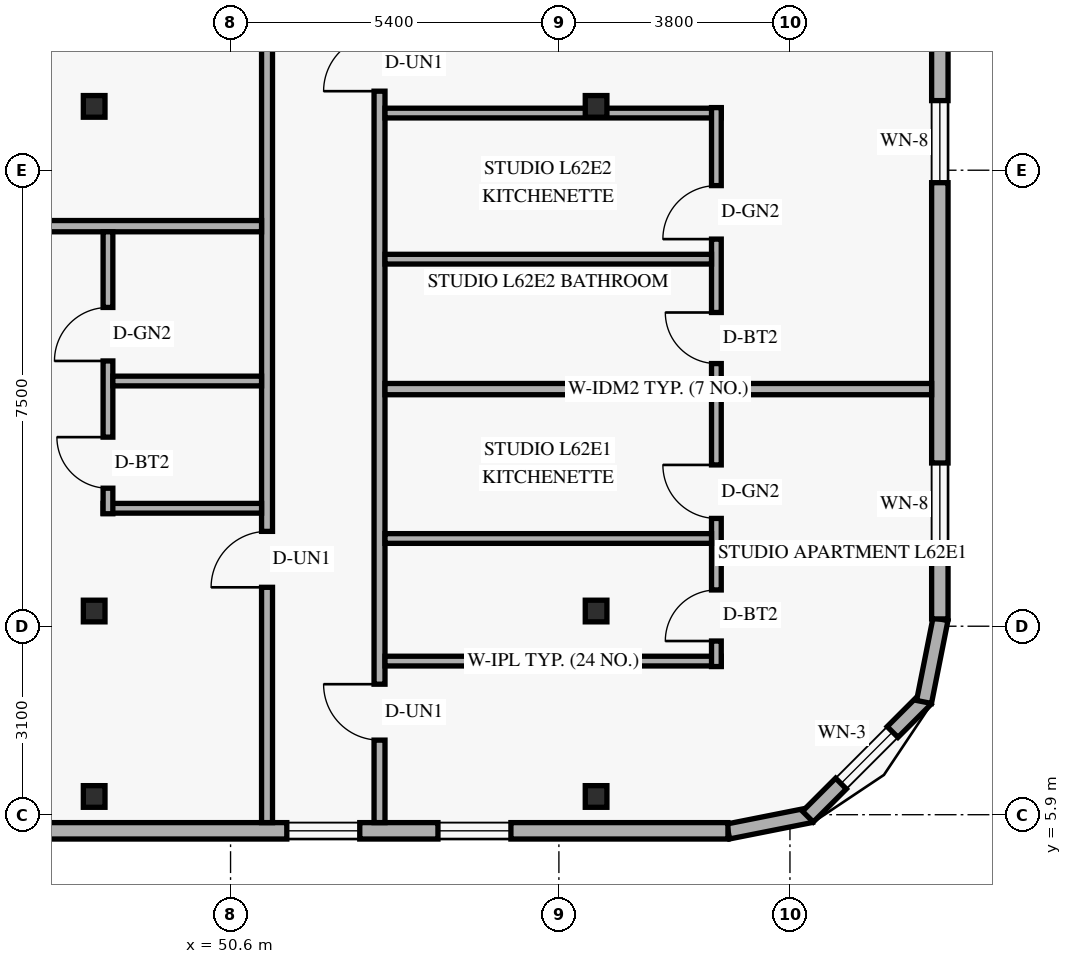
"""IFC4 building model, lengths in metres.
Left out: names, types, materials, properties, quantities, classifications, styles, units other than length and angle.
Written with IfcOpenShell. Run it as: python <this file> out.ifc"""

import sys

from ifc_helpers import new_model, si_unit, direction, frame, frame_2d, origin, origin_2d, place, context, subcontext, project, spatial, rectangle, hollow_rectangle, extrude, element, fill, save


model = new_model("IFC4")
c1 = context("Model", 3, precision=1e-05, world=origin(), true_north=direction((0.0, 1.0)))
c2 = subcontext(c1, "Body", "Model", "MODEL_VIEW")
j1 = project(units=[si_unit("LENGTHUNIT", "METRE"), si_unit("PLANEANGLEUNIT", "RADIAN")], contexts=[c1])
p1 = place(None, origin())
s1 = spatial("IfcSite", under=j1, at=p1, CompositionType="ELEMENT")
p2 = place(p1, origin())
s2 = spatial("IfcBuilding", under=s1, at=p2, CompositionType="ELEMENT")
p3 = place(p2, frame((0.0, 0.0, 238.8)))
s3 = spatial("IfcBuildingStorey", under=s2, at=p3, CompositionType="ELEMENT", Elevation=238.8)
for number, where, z_axis, x_axis in (
    (1, (48.294, 6.2, 0.0), (0.035, 0.0, 0.999), (0.0, 1.0, 0.0)),
    (2, (48.294, 9.25, 0.0), (0.035, 0.0, 0.999), (0.0, 1.0, 0.0)),
    (3, (48.294, 17.55, 0.0), (0.035, 0.0, 0.999), (0.0, 1.0, 0.0)),
):
    element("IfcColumn", number, at=place(p3, frame(where, z_axis=z_axis, x_axis=x_axis)), inside=s3, PredefinedType="COLUMN", context=c2, shape_type="SweptSolid", body=[
        extrude(hollow_rectangle(XDim=0.356, YDim=0.356, WallThickness=0.016, at=origin_2d()), origin(), (0.0, 0.0, 1.0), 3.602),
    ])
for number, where, z_axis, x_axis in (
    (4, (56.507, 6.2, 0.0), (0.058, 0.0, 0.998), (0.0, 1.0, 0.0)),
    (5, (56.507, 9.25, 0.0), (0.058, 0.0, 0.998), (0.0, 1.0, 0.0)),
    (6, (56.507, 17.55, 0.0), (0.058, 0.0, 0.998), (0.0, 1.0, 0.0)),
):
    element("IfcColumn", number, at=place(p3, frame(where, z_axis=z_axis, x_axis=x_axis)), inside=s3, PredefinedType="COLUMN", context=c2, shape_type="SweptSolid", body=[
        extrude(hollow_rectangle(XDim=0.356, YDim=0.356, WallThickness=0.016, at=origin_2d()), origin(), (0.0, 0.0, 1.0), 3.606),
    ])
p4 = place(p3, frame((58.783, 5.624, 0.0), z_axis=(0.0, 0.0, 1.0), x_axis=(0.980809899341, 0.19496651342, 0.0)))
e7 = element("IfcWall", 7, at=p4, inside=s3, PredefinedType="SOLIDWALL", context=c2, shape_type="SweptSolid", body=[
    extrude(rectangle(XDim=1.389, YDim=0.25, at=frame_2d((0.694, 0.0))), origin(), (0.0, 0.0, 1.0), 3.36),
])
p5 = place(p3, frame((60.095, 5.868, 0.0), z_axis=(0.0, 0.0, 1.0), x_axis=(0.707106781187, 0.707106781187, 0.0)))
e8 = element("IfcWall", 8, at=p5, inside=s3, PredefinedType="SOLIDWALL", context=c2, shape_type="SweptSolid", body=[
    extrude(rectangle(XDim=2.739, YDim=0.25, at=frame_2d((1.37, 0.0))), origin(), (0.0, 0.0, 1.0), 3.36),
])
p6 = place(p5, frame((0.77, 0.0, 0.85)))
e9 = element("IfcOpeningElement", 9, at=p6, cuts=e8, PredefinedType="OPENING", context=c2, shape_type="SweptSolid", body=[
    extrude(rectangle(XDim=1.2, YDim=1.5, at=frame_2d((0.6, 0.75))), frame((0.0, 0.135, 0.0), z_axis=(0.0, -1.0, 0.0), x_axis=(1.0, 0.0, 0.0)), (0.0, 0.0, 1.0), 0.27),
])
p7 = place(p3, frame((62.005, 7.754, 0.0), z_axis=(0.0, 0.0, 1.0), x_axis=(0.195135625965, 0.9807762678, 0.0)))
e10 = element("IfcWall", 10, at=p7, inside=s3, PredefinedType="SOLIDWALL", context=c2, shape_type="SweptSolid", body=[
    extrude(rectangle(XDim=1.389, YDim=0.25, at=frame_2d((0.694, 0.0))), origin(), (0.0, 0.0, 1.0), 3.36),
])
p8 = place(p3, frame((25.82, 5.635, 0.0), z_axis=(0.0, 0.0, 1.0), x_axis=(1.0, 0.0, 0.0)))
e11 = element("IfcWall", 11, at=p8, inside=s3, PredefinedType="SOLIDWALL", context=c2, shape_type="SweptSolid", body=[
    extrude(rectangle(XDim=32.96, YDim=0.27, at=frame_2d((16.48, 0.0))), origin(), (0.0, 0.0, 1.0), 3.36),
])
p9 = place(p8, frame((3.87, 0.0, 0.85)))
e12 = element("IfcOpeningElement", 12, at=p9, cuts=e11, PredefinedType="OPENING", context=c2, shape_type="SweptSolid", body=[
    extrude(rectangle(XDim=1.2, YDim=1.5, at=frame_2d((0.6, 0.75))), frame((0.0, 0.145, 0.0), z_axis=(0.0, -1.0, 0.0), x_axis=(1.0, 0.0, 0.0)), (0.0, 0.0, 1.0), 0.29),
])
p10 = place(p8, frame((16.313, 0.0, 0.85)))
e13 = element("IfcOpeningElement", 13, at=p10, cuts=e11, PredefinedType="OPENING", context=c2, shape_type="SweptSolid", body=[
    extrude(rectangle(XDim=1.2, YDim=1.5, at=frame_2d((0.6, 0.75))), frame((0.0, 0.145, 0.0), z_axis=(0.0, -1.0, 0.0), x_axis=(1.0, 0.0, 0.0)), (0.0, 0.0, 1.0), 0.29),
])
p11 = place(p8, frame((25.705, 0.0, 0.85)))
e14 = element("IfcOpeningElement", 14, at=p11, cuts=e11, PredefinedType="OPENING", context=c2, shape_type="SweptSolid", body=[
    extrude(rectangle(XDim=1.2, YDim=1.5, at=frame_2d((0.6, 0.75))), frame((0.0, 0.145, 0.0), z_axis=(0.0, -1.0, 0.0), x_axis=(1.0, 0.0, 0.0)), (0.0, 0.0, 1.0), 0.29),
])
p12 = place(p8, frame((28.191, 0.0, 0.85)))
e15 = element("IfcOpeningElement", 15, at=p12, cuts=e11, PredefinedType="OPENING", context=c2, shape_type="SweptSolid", body=[
    extrude(rectangle(XDim=1.2, YDim=1.5, at=frame_2d((0.6, 0.75))), frame((0.0, 0.145, 0.0), z_axis=(0.0, -1.0, 0.0), x_axis=(1.0, 0.0, 0.0)), (0.0, 0.0, 1.0), 0.29),
])
p13 = place(p3, frame((62.265, 9.12, 0.0), z_axis=(0.0, 0.0, 1.0), x_axis=(0.0, 1.0, 0.0)))
e16 = element("IfcWall", 16, at=p13, inside=s3, PredefinedType="SOLIDWALL", context=c2, shape_type="SweptSolid", body=[
    extrude(rectangle(XDim=29.76, YDim=0.27, at=frame_2d((14.88, 0.0))), origin(), (0.0, 0.0, 1.0), 3.36),
])
p14 = place(p13, frame((1.215, 0.0, 0.85)))
e17 = element("IfcOpeningElement", 17, at=p14, cuts=e16, PredefinedType="OPENING", context=c2, shape_type="SweptSolid", body=[
    extrude(rectangle(XDim=1.35, YDim=1.55, at=frame_2d((0.675, 0.775))), frame((0.0, 0.145, 0.0), z_axis=(0.0, -1.0, 0.0), x_axis=(1.0, 0.0, 0.0)), (0.0, 0.0, 1.0), 0.29),
])
p15 = place(p13, frame((7.175, 0.0, 0.85)))
e18 = element("IfcOpeningElement", 18, at=p15, cuts=e16, PredefinedType="OPENING", context=c2, shape_type="SweptSolid", body=[
    extrude(rectangle(XDim=1.35, YDim=1.55, at=frame_2d((0.675, 0.775))), frame((0.0, 0.145, 0.0), z_axis=(0.0, -1.0, 0.0), x_axis=(1.0, 0.0, 0.0)), (0.0, 0.0, 1.0), 0.29),
])
p16 = place(p13, frame((14.17, 0.0, 0.85)))
e19 = element("IfcOpeningElement", 19, at=p16, cuts=e16, PredefinedType="OPENING", context=c2, shape_type="SweptSolid", body=[
    extrude(rectangle(XDim=1.35, YDim=1.55, at=frame_2d((0.675, 0.775))), frame((0.0, 0.145, 0.0), z_axis=(0.0, -1.0, 0.0), x_axis=(1.0, 0.0, 0.0)), (0.0, 0.0, 1.0), 0.29),
])
p17 = place(p13, frame((18.24, 0.0, 0.85)))
e20 = element("IfcOpeningElement", 20, at=p17, cuts=e16, PredefinedType="OPENING", context=c2, shape_type="SweptSolid", body=[
    extrude(rectangle(XDim=1.35, YDim=1.55, at=frame_2d((0.675, 0.775))), frame((0.0, 0.145, 0.0), z_axis=(0.0, -1.0, 0.0), x_axis=(1.0, 0.0, 0.0)), (0.0, 0.0, 1.0), 0.29),
])
p18 = place(p13, frame((22.9, 0.0, 0.85)))
e21 = element("IfcOpeningElement", 21, at=p18, cuts=e16, PredefinedType="OPENING", context=c2, shape_type="SweptSolid", body=[
    extrude(rectangle(XDim=1.35, YDim=1.55, at=frame_2d((0.675, 0.775))), frame((0.0, 0.145, 0.0), z_axis=(0.0, -1.0, 0.0), x_axis=(1.0, 0.0, 0.0)), (0.0, 0.0, 1.0), 0.29),
])
p19 = place(p13, frame((27.75, 0.0, 0.85)))
e22 = element("IfcOpeningElement", 22, at=p19, cuts=e16, PredefinedType="OPENING", context=c2, shape_type="SweptSolid", body=[
    extrude(rectangle(XDim=1.35, YDim=1.55, at=frame_2d((0.675, 0.775))), frame((0.0, 0.145, 0.0), z_axis=(0.0, -1.0, 0.0), x_axis=(1.0, 0.0, 0.0)), (0.0, 0.0, 1.0), 0.29),
])
p20 = place(p3, frame((51.2, 5.77, 0.0), z_axis=(0.0, 0.0, 1.0), x_axis=(0.0, 1.0, 0.0)))
e23 = element("IfcWall", 23, at=p20, inside=s3, PredefinedType="STANDARD", context=c2, shape_type="SweptSolid", body=[
    extrude(rectangle(XDim=13.03, YDim=0.18, at=frame_2d((6.515, 0.0))), origin(), (0.0, 0.0, 1.0), 2.803),
])
p21 = place(p20, frame((3.87, 0.0, 0.0)))
e24 = element("IfcOpeningElement", 24, at=p21, cuts=e23, PredefinedType="OPENING", context=c2, shape_type="SweptSolid", body=[
    extrude(rectangle(XDim=0.92, YDim=2.15, at=frame_2d((0.46, 1.075))), frame((0.0, 0.1, 0.0), z_axis=(0.0, -1.0, 0.0), x_axis=(1.0, 0.0, 0.0)), (0.0, 0.0, 1.0), 0.2),
])
p22 = place(p3, frame((53.05, 5.77, 0.0), z_axis=(0.0, 0.0, 1.0), x_axis=(0.0, 1.0, 0.0)))
e25 = element("IfcWall", 25, at=p22, inside=s3, PredefinedType="STANDARD", context=c2, shape_type="SweptSolid", body=[
    extrude(rectangle(XDim=36.46, YDim=0.18, at=frame_2d((18.23, 0.0))), origin(), (0.0, 0.0, 1.0), 2.803),
])
p23 = place(p22, frame((1.357, 0.0, 0.0)))
e26 = element("IfcOpeningElement", 26, at=p23, cuts=e25, PredefinedType="OPENING", context=c2, shape_type="SweptSolid", body=[
    extrude(rectangle(XDim=0.92, YDim=2.15, at=frame_2d((0.46, 1.075))), frame((0.0, 0.1, 0.0), z_axis=(0.0, -1.0, 0.0), x_axis=(1.0, 0.0, 0.0)), (0.0, 0.0, 1.0), 0.2),
])
p24 = place(p22, frame((12.03, 0.0, 0.0)))
e27 = element("IfcOpeningElement", 27, at=p24, cuts=e25, PredefinedType="OPENING", context=c2, shape_type="SweptSolid", body=[
    extrude(rectangle(XDim=0.92, YDim=2.15, at=frame_2d((0.46, 1.075))), frame((0.0, 0.1, 0.0), z_axis=(0.0, -1.0, 0.0), x_axis=(1.0, 0.0, 0.0)), (0.0, 0.0, 1.0), 0.2),
])
p25 = place(p22, frame((20.27, 0.0, 0.0)))
e28 = element("IfcOpeningElement", 28, at=p25, cuts=e25, PredefinedType="OPENING", context=c2, shape_type="SweptSolid", body=[
    extrude(rectangle(XDim=0.92, YDim=2.15, at=frame_2d((0.46, 1.075))), frame((0.0, 0.1, 0.0), z_axis=(0.0, -1.0, 0.0), x_axis=(1.0, 0.0, 0.0)), (0.0, 0.0, 1.0), 0.2),
])
p26 = place(p22, frame((28.21, 0.0, 0.0)))
e29 = element("IfcOpeningElement", 29, at=p26, cuts=e25, PredefinedType="OPENING", context=c2, shape_type="SweptSolid", body=[
    extrude(rectangle(XDim=0.92, YDim=2.15, at=frame_2d((0.46, 1.075))), frame((0.0, 0.1, 0.0), z_axis=(0.0, -1.0, 0.0), x_axis=(1.0, 0.0, 0.0)), (0.0, 0.0, 1.0), 0.2),
])
p27 = place(p22, frame((35.21, 0.0, 0.0)))
e30 = element("IfcOpeningElement", 30, at=p27, cuts=e25, PredefinedType="OPENING", context=c2, shape_type="SweptSolid", body=[
    extrude(rectangle(XDim=0.92, YDim=2.15, at=frame_2d((0.46, 1.075))), frame((0.0, 0.1, 0.0), z_axis=(0.0, -1.0, 0.0), x_axis=(1.0, 0.0, 0.0)), (0.0, 0.0, 1.0), 0.2),
])
p28 = place(p3, frame((53.14, 8.427, 0.0), z_axis=(0.0, 0.0, 1.0), x_axis=(1.0, 0.0, 0.0)))
e31 = element("IfcWall", 31, at=p28, inside=s3, PredefinedType="PLUMBINGWALL", context=c2, shape_type="SweptSolid", body=[
    extrude(rectangle(XDim=5.53, YDim=0.16, at=frame_2d((2.765, 0.0))), origin(), (0.0, 0.0, 1.0), 2.879),
])
p29 = place(p3, frame((58.59, 8.337, 0.0), z_axis=(0.0, 0.0, 1.0), x_axis=(0.0, 1.0, 0.0)))
e32 = element("IfcWall", 32, at=p29, inside=s3, PredefinedType="PLUMBINGWALL", context=c2, shape_type="SweptSolid", body=[
    extrude(rectangle(XDim=4.563, YDim=0.16, at=frame_2d((2.282, 0.0))), origin(), (0.0, 0.0, 1.0), 3.36),
])
p30 = place(p29, frame((0.42, 0.0, 0.0)))
e33 = element("IfcOpeningElement", 33, at=p30, cuts=e32, PredefinedType="OPENING", context=c2, shape_type="SweptSolid", body=[
    extrude(rectangle(XDim=0.84, YDim=2.12, at=frame_2d((0.42, 1.06))), frame((0.0, 0.09, 0.0), z_axis=(0.0, -1.0, 0.0), x_axis=(1.0, 0.0, 0.0)), (0.0, 0.0, 1.0), 0.18),
])
p31 = place(p29, frame((2.436, 0.0, 0.0)))
e34 = element("IfcOpeningElement", 34, at=p31, cuts=e32, PredefinedType="OPENING", context=c2, shape_type="SweptSolid", body=[
    extrude(rectangle(XDim=0.88, YDim=2.12, at=frame_2d((0.44, 1.06))), frame((0.0, 0.09, 0.0), z_axis=(0.0, -1.0, 0.0), x_axis=(1.0, 0.0, 0.0)), (0.0, 0.0, 1.0), 0.18),
])
p32 = place(p3, frame((53.14, 10.443, 0.0), z_axis=(0.0, 0.0, 1.0), x_axis=(1.0, 0.0, 0.0)))
e35 = element("IfcWall", 35, at=p32, inside=s3, PredefinedType="PLUMBINGWALL", context=c2, shape_type="SweptSolid", body=[
    extrude(rectangle(XDim=5.37, YDim=0.16, at=frame_2d((2.685, 0.0))), origin(), (0.0, 0.0, 1.0), 2.879),
])
p33 = place(p3, frame((53.14, 12.9, 0.0), z_axis=(0.0, 0.0, 1.0), x_axis=(1.0, 0.0, 0.0)))
e36 = element("IfcWall", 36, at=p33, inside=s3, PredefinedType="PARTITIONING", context=c2, shape_type="SweptSolid", body=[
    extrude(rectangle(XDim=8.99, YDim=0.185, at=frame_2d((4.495, 0.0))), origin(), (0.0, 0.0, 1.0), 2.879),
])
p34 = place(p3, frame((53.14, 17.44, 0.0), z_axis=(0.0, 0.0, 1.0), x_axis=(1.0, 0.0, 0.0)))
e37 = element("IfcWall", 37, at=p34, inside=s3, PredefinedType="PLUMBINGWALL", context=c2, shape_type="SweptSolid", body=[
    extrude(rectangle(XDim=5.53, YDim=0.16, at=frame_2d((2.765, 0.0))), origin(), (0.0, 0.0, 1.0), 2.803),
])
p35 = place(p3, frame((58.59, 12.992, 0.0), z_axis=(0.0, 0.0, 1.0), x_axis=(0.0, 1.0, 0.0)))
e38 = element("IfcWall", 38, at=p35, inside=s3, PredefinedType="PLUMBINGWALL", context=c2, shape_type="SweptSolid", body=[
    extrude(rectangle(XDim=4.538, YDim=0.16, at=frame_2d((2.269, 0.0))), origin(), (0.0, 0.0, 1.0), 3.36),
])
p36 = place(p35, frame((0.327, 0.0, 0.0)))
e39 = element("IfcOpeningElement", 39, at=p36, cuts=e38, PredefinedType="OPENING", context=c2, shape_type="SweptSolid", body=[
    extrude(rectangle(XDim=0.84, YDim=2.12, at=frame_2d((0.42, 1.06))), frame((0.0, 0.09, 0.0), z_axis=(0.0, -1.0, 0.0), x_axis=(1.0, 0.0, 0.0)), (0.0, 0.0, 1.0), 0.18),
])
p37 = place(p35, frame((2.375, 0.0, 0.0)))
e40 = element("IfcOpeningElement", 40, at=p37, cuts=e38, PredefinedType="OPENING", context=c2, shape_type="SweptSolid", body=[
    extrude(rectangle(XDim=0.88, YDim=2.12, at=frame_2d((0.44, 1.06))), frame((0.0, 0.09, 0.0), z_axis=(0.0, -1.0, 0.0), x_axis=(1.0, 0.0, 0.0)), (0.0, 0.0, 1.0), 0.18),
])
p38 = place(p3, frame((53.14, 15.037, 0.0), z_axis=(0.0, 0.0, 1.0), x_axis=(1.0, 0.0, 0.0)))
e41 = element("IfcWall", 41, at=p38, inside=s3, PredefinedType="PLUMBINGWALL", context=c2, shape_type="SweptSolid", body=[
    extrude(rectangle(XDim=5.37, YDim=0.16, at=frame_2d((2.685, 0.0))), origin(), (0.0, 0.0, 1.0), 2.879),
])
p39 = place(p3, frame((37.64, 15.58, 0.0), z_axis=(0.0, 0.0, 1.0), x_axis=(1.0, 0.0, 0.0)))
e42 = element("IfcWall", 42, at=p39, inside=s3, PredefinedType="PARTITIONING", context=c2, shape_type="SweptSolid", body=[
    extrude(rectangle(XDim=13.47, YDim=0.185, at=frame_2d((6.735, 0.0))), origin(), (0.0, 0.0, 1.0), 2.803),
])
p40 = place(p3, frame((48.504, 10.94, 0.0), z_axis=(0.0, 0.0, 1.0), x_axis=(1.0, 0.0, 0.0)))
e43 = element("IfcWall", 43, at=p40, inside=s3, PredefinedType="PLUMBINGWALL", context=c2, shape_type="SweptSolid", body=[
    extrude(rectangle(XDim=2.606, YDim=0.16, at=frame_2d((1.303, 0.0))), origin(), (0.0, 0.0, 1.0), 2.803),
])
p41 = place(p3, frame((48.584, 10.85, 0.0), z_axis=(0.0, 0.0, 1.0), x_axis=(0.0, 1.0, 0.0)))
e44 = element("IfcWall", 44, at=p41, inside=s3, PredefinedType="PLUMBINGWALL", context=c2, shape_type="SweptSolid", body=[
    extrude(rectangle(XDim=4.637, YDim=0.16, at=frame_2d((2.319, 0.0))), origin(), (0.0, 0.0, 1.0), 2.803),
])
p42 = place(p41, frame((0.42, 0.0, 0.0)))
e45 = element("IfcOpeningElement", 45, at=p42, cuts=e44, PredefinedType="OPENING", context=c2, shape_type="SweptSolid", body=[
    extrude(rectangle(XDim=0.84, YDim=2.12, at=frame_2d((0.42, 1.06))), frame((0.0, 0.09, 0.0), z_axis=(0.0, -1.0, 0.0), x_axis=(1.0, 0.0, 0.0)), (0.0, 0.0, 1.0), 0.18),
])
p43 = place(p41, frame((2.513, 0.0, 0.0)))
e46 = element("IfcOpeningElement", 46, at=p43, cuts=e44, PredefinedType="OPENING", context=c2, shape_type="SweptSolid", body=[
    extrude(rectangle(XDim=0.88, YDim=2.12, at=frame_2d((0.44, 1.06))), frame((0.0, 0.09, 0.0), z_axis=(0.0, -1.0, 0.0), x_axis=(1.0, 0.0, 0.0)), (0.0, 0.0, 1.0), 0.18),
])
p44 = place(p3, frame((48.664, 13.033, 0.0), z_axis=(0.0, 0.0, 1.0), x_axis=(1.0, 0.0, 0.0)))
e47 = element("IfcWall", 47, at=p44, inside=s3, PredefinedType="PLUMBINGWALL", context=c2, shape_type="SweptSolid", body=[
    extrude(rectangle(XDim=2.446, YDim=0.16, at=frame_2d((1.223, 0.0))), origin(), (0.0, 0.0, 1.0), 3.36),
])
p45 = place(p6, origin())
e48 = element("IfcWindow", 48, at=p45, inside=s3, PartitioningType="SINGLE_PANEL", PredefinedType="WINDOW", context=c2, shape_type="SweptSolid", body=[
    extrude(rectangle(XDim=1.2, YDim=1.5, at=frame_2d((0.6, 0.75))), frame((0.0, 0.03, 0.0), z_axis=(0.0, -1.0, 0.0), x_axis=(1.0, 0.0, 0.0)), (0.0, 0.0, 1.0), 0.06),
])
fill(e9, e48)
p46 = place(p11, origin())
e49 = element("IfcWindow", 49, at=p46, inside=s3, PartitioningType="SINGLE_PANEL", PredefinedType="WINDOW", context=c2, shape_type="SweptSolid", body=[
    extrude(rectangle(XDim=1.2, YDim=1.5, at=frame_2d((0.6, 0.75))), frame((0.0, 0.03, 0.0), z_axis=(0.0, -1.0, 0.0), x_axis=(1.0, 0.0, 0.0)), (0.0, 0.0, 1.0), 0.06),
])
fill(e14, e49)
p47 = place(p12, origin())
e50 = element("IfcWindow", 50, at=p47, inside=s3, PartitioningType="SINGLE_PANEL", PredefinedType="WINDOW", context=c2, shape_type="SweptSolid", body=[
    extrude(rectangle(XDim=1.2, YDim=1.5, at=frame_2d((0.6, 0.75))), frame((0.0, 0.03, 0.0), z_axis=(0.0, -1.0, 0.0), x_axis=(1.0, 0.0, 0.0)), (0.0, 0.0, 1.0), 0.06),
])
fill(e15, e50)
p48 = place(p14, origin())
e51 = element("IfcWindow", 51, at=p48, inside=s3, PartitioningType="SINGLE_PANEL", PredefinedType="WINDOW", context=c2, shape_type="SweptSolid", body=[
    extrude(rectangle(XDim=1.35, YDim=1.55, at=frame_2d((0.675, 0.775))), frame((0.0, 0.03, 0.0), z_axis=(0.0, -1.0, 0.0), x_axis=(1.0, 0.0, 0.0)), (0.0, 0.0, 1.0), 0.06),
])
fill(e17, e51)
p49 = place(p15, origin())
e52 = element("IfcWindow", 52, at=p49, inside=s3, PartitioningType="SINGLE_PANEL", PredefinedType="WINDOW", context=c2, shape_type="SweptSolid", body=[
    extrude(rectangle(XDim=1.35, YDim=1.55, at=frame_2d((0.675, 0.775))), frame((0.0, 0.03, 0.0), z_axis=(0.0, -1.0, 0.0), x_axis=(1.0, 0.0, 0.0)), (0.0, 0.0, 1.0), 0.06),
])
fill(e18, e52)
p50 = place(p23, origin())
e53 = element("IfcDoor", 53, at=p50, inside=s3, OperationType="SINGLE_SWING_RIGHT", PredefinedType="DOOR", context=c2, shape_type="SweptSolid", body=[
    extrude(rectangle(XDim=0.92, YDim=2.15, at=frame_2d((0.46, 1.075))), frame((0.0, 0.025, 0.0), z_axis=(0.0, -1.0, 0.0), x_axis=(1.0, 0.0, 0.0)), (0.0, 0.0, 1.0), 0.05),
])
fill(e26, e53)
p51 = place(p30, origin())
e54 = element("IfcDoor", 54, at=p51, inside=s3, OperationType="SINGLE_SWING_LEFT", PredefinedType="DOOR", context=c2, shape_type="SweptSolid", body=[
    extrude(rectangle(XDim=0.84, YDim=2.12, at=frame_2d((0.42, 1.06))), frame((0.0, 0.025, 0.0), z_axis=(0.0, -1.0, 0.0), x_axis=(1.0, 0.0, 0.0)), (0.0, 0.0, 1.0), 0.05),
])
fill(e33, e54)
p52 = place(p31, origin())
e55 = element("IfcDoor", 55, at=p52, inside=s3, OperationType="SINGLE_SWING_RIGHT", PredefinedType="DOOR", context=c2, shape_type="SweptSolid", body=[
    extrude(rectangle(XDim=0.88, YDim=2.12, at=frame_2d((0.44, 1.06))), frame((0.0, 0.025, 0.0), z_axis=(0.0, -1.0, 0.0), x_axis=(1.0, 0.0, 0.0)), (0.0, 0.0, 1.0), 0.05),
])
fill(e34, e55)
p53 = place(p24, origin())
e56 = element("IfcDoor", 56, at=p53, inside=s3, OperationType="SINGLE_SWING_LEFT", PredefinedType="DOOR", context=c2, shape_type="SweptSolid", body=[
    extrude(rectangle(XDim=0.92, YDim=2.15, at=frame_2d((0.46, 1.075))), frame((0.0, 0.025, 0.0), z_axis=(0.0, -1.0, 0.0), x_axis=(1.0, 0.0, 0.0)), (0.0, 0.0, 1.0), 0.05),
])
fill(e27, e56)
p54 = place(p36, origin())
e57 = element("IfcDoor", 57, at=p54, inside=s3, OperationType="SINGLE_SWING_RIGHT", PredefinedType="DOOR", context=c2, shape_type="SweptSolid", body=[
    extrude(rectangle(XDim=0.84, YDim=2.12, at=frame_2d((0.42, 1.06))), frame((0.0, 0.025, 0.0), z_axis=(0.0, -1.0, 0.0), x_axis=(1.0, 0.0, 0.0)), (0.0, 0.0, 1.0), 0.05),
])
fill(e39, e57)
p55 = place(p37, origin())
e58 = element("IfcDoor", 58, at=p55, inside=s3, OperationType="SINGLE_SWING_LEFT", PredefinedType="DOOR", context=c2, shape_type="SweptSolid", body=[
    extrude(rectangle(XDim=0.88, YDim=2.12, at=frame_2d((0.44, 1.06))), frame((0.0, 0.025, 0.0), z_axis=(0.0, -1.0, 0.0), x_axis=(1.0, 0.0, 0.0)), (0.0, 0.0, 1.0), 0.05),
])
fill(e40, e58)
p56 = place(p21, origin())
e59 = element("IfcDoor", 59, at=p56, inside=s3, OperationType="SINGLE_SWING_LEFT", PredefinedType="DOOR", context=c2, shape_type="SweptSolid", body=[
    extrude(rectangle(XDim=0.92, YDim=2.15, at=frame_2d((0.46, 1.075))), frame((0.0, 0.025, 0.0), z_axis=(0.0, -1.0, 0.0), x_axis=(1.0, 0.0, 0.0)), (0.0, 0.0, 1.0), 0.05),
])
fill(e24, e59)
p57 = place(p42, origin())
e60 = element("IfcDoor", 60, at=p57, inside=s3, OperationType="SINGLE_SWING_RIGHT", PredefinedType="DOOR", context=c2, shape_type="SweptSolid", body=[
    extrude(rectangle(XDim=0.84, YDim=2.12, at=frame_2d((0.42, 1.06))), frame((0.0, 0.025, 0.0), z_axis=(0.0, -1.0, 0.0), x_axis=(1.0, 0.0, 0.0)), (0.0, 0.0, 1.0), 0.05),
])
fill(e45, e60)
p58 = place(p43, origin())
e61 = element("IfcDoor", 61, at=p58, inside=s3, OperationType="SINGLE_SWING_LEFT", PredefinedType="DOOR", context=c2, shape_type="SweptSolid", body=[
    extrude(rectangle(XDim=0.88, YDim=2.12, at=frame_2d((0.44, 1.06))), frame((0.0, 0.025, 0.0), z_axis=(0.0, -1.0, 0.0), x_axis=(1.0, 0.0, 0.0)), (0.0, 0.0, 1.0), 0.05),
])
fill(e46, e61)
save(model, sys.argv[1])
